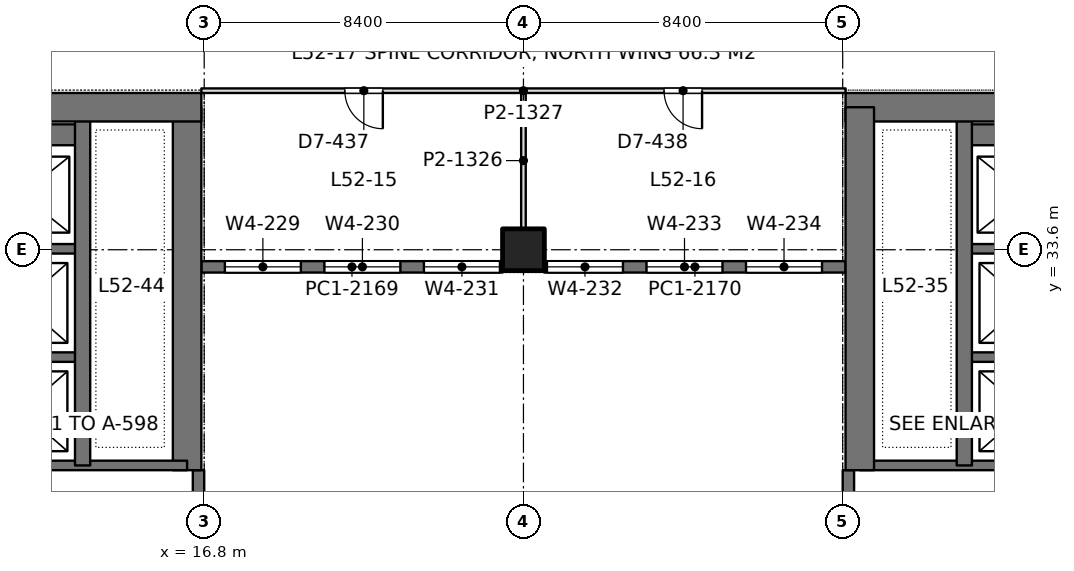
"""IFC4 building model, lengths in metres.
Left out: names, types, materials, properties, quantities, classifications, styles, units other than length and angle.
Written with IfcOpenShell. Run it as: python <this file> out.ifc"""

import sys

from ifc_helpers import new_model, si_unit, direction, frame, frame_2d, origin, origin_2d, place, context, subcontext, project, spatial, rectangle, extrude, element, fill, save


model = new_model("IFC4")
c1 = context("Model", 3, precision=1e-05, world=origin(), true_north=direction((0.0, 1.0)))
c2 = subcontext(c1, "Body", "Model", "MODEL_VIEW")
j1 = project(units=[si_unit("LENGTHUNIT", "METRE"), si_unit("PLANEANGLEUNIT", "RADIAN")], contexts=[c1])
p1 = place(None, origin())
s1 = spatial("IfcSite", under=j1, at=p1, CompositionType="ELEMENT")
p2 = place(p1, origin())
s2 = spatial("IfcBuilding", under=s1, at=p2, CompositionType="ELEMENT")
p3 = place(p2, frame((0.0, 0.0, 228.0)))
s3 = spatial("IfcBuildingStorey", under=s2, at=p3, CompositionType="ELEMENT", Elevation=228.0)
p4 = place(p3, frame((25.2, 33.6, 0.0), z_axis=(0.0, 0.0, 1.0), x_axis=(1.0, 0.0, 0.0)))
e1 = element("IfcColumn", 1, at=p4, inside=s3, PredefinedType="COLUMN", context=c2, shape_type="SweptSolid", body=[
    extrude(rectangle(XDim=1.1, YDim=1.1, at=origin_2d()), origin(), (0.0, 0.0, 1.0), 4.2),
])
p5 = place(p3, frame((-1.125, 37.35, 0.0), z_axis=(0.0, 0.0, 1.0), x_axis=(1.0, 0.0, 0.0)))
e2 = element("IfcWall", 2, at=p5, inside=s3, PredefinedType="SHEAR", context=c2, shape_type="SweptSolid", body=[
    extrude(rectangle(XDim=17.85, YDim=0.75, at=frame_2d((8.925, 0.0))), origin(), (0.0, 0.0, 1.0), 4.2),
])
p6 = place(p5, frame((8.875, 0.0, 0.0)))
e3 = element("IfcOpeningElement", 3, at=p6, cuts=e2, PredefinedType="OPENING", context=c2, shape_type="SweptSolid", body=[
    extrude(rectangle(XDim=1.8, YDim=2.4, at=frame_2d((0.9, 1.2))), frame((0.0, 0.385, 0.0), z_axis=(0.0, -1.0, 0.0), x_axis=(1.0, 0.0, 0.0)), (0.0, 0.0, 1.0), 0.77),
])
p7 = place(p3, frame((16.35, 27.8, 0.0), z_axis=(0.0, 0.0, 1.0), x_axis=(0.0, 1.0, 0.0)))
e4 = element("IfcWall", 4, at=p7, inside=s3, PredefinedType="SHEAR", context=c2, shape_type="SweptSolid", body=[
    extrude(rectangle(XDim=9.55, YDim=0.75, at=frame_2d((4.775, 0.0))), origin(), (0.0, 0.0, 1.0), 4.2),
])
p8 = place(p3, frame((13.6, 27.925, 0.0), z_axis=(0.0, 0.0, 1.0), x_axis=(0.0, 1.0, 0.0)))
e5 = element("IfcWall", 5, at=p8, inside=s3, PredefinedType="SHEAR", context=c2, shape_type="SweptSolid", body=[
    extrude(rectangle(XDim=9.425, YDim=0.4, at=frame_2d((4.712, 0.0))), origin(), (0.0, 0.0, 1.0), 4.2),
])
p9 = place(p3, frame((10.4, 27.925, 0.0), z_axis=(0.0, 0.0, 1.0), x_axis=(1.0, 0.0, 0.0)))
e6 = element("IfcWall", 6, at=p9, inside=s3, PredefinedType="SHEAR", context=c2, shape_type="SweptSolid", body=[
    extrude(rectangle(XDim=5.95, YDim=0.25, at=frame_2d((2.975, 0.0))), origin(), (0.0, 0.0, 1.0), 4.2),
])
for number, where, z_axis, x_axis in (
    (7, (10.4, 30.775, 0.0), (0.0, 0.0, 1.0), (1.0, 0.0, 0.0)),
    (8, (10.4, 33.625, 0.0), (0.0, 0.0, 1.0), (1.0, 0.0, 0.0)),
):
    element("IfcWall", number, at=place(p3, frame(where, z_axis=z_axis, x_axis=x_axis)), inside=s3, PredefinedType="SHEAR", context=c2, shape_type="SweptSolid", body=[
        extrude(rectangle(XDim=3.2, YDim=0.25, at=frame_2d((1.6, 0.0))), origin(), (0.0, 0.0, 1.0), 4.2),
    ])
p10 = place(p3, frame((10.4, 36.625, 0.0), z_axis=(0.0, 0.0, 1.0), x_axis=(1.0, 0.0, 0.0)))
e9 = element("IfcWall", 9, at=p10, inside=s3, PredefinedType="SHEAR", context=c2, shape_type="SweptSolid", body=[
    extrude(rectangle(XDim=3.2, YDim=0.55, at=frame_2d((1.6, 0.0))), origin(), (0.0, 0.0, 1.0), 4.2),
])
p11 = place(p3, frame((33.675, 37.35, 0.0), z_axis=(0.0, 0.0, 1.0), x_axis=(1.0, 0.0, 0.0)))
e10 = element("IfcWall", 10, at=p11, inside=s3, PredefinedType="SHEAR", context=c2, shape_type="SweptSolid", body=[
    extrude(rectangle(XDim=17.85, YDim=0.75, at=frame_2d((8.925, 0.0))), origin(), (0.0, 0.0, 1.0), 4.2),
])
p12 = place(p11, frame((7.175, 0.0, 0.0)))
e11 = element("IfcOpeningElement", 11, at=p12, cuts=e10, PredefinedType="OPENING", context=c2, shape_type="SweptSolid", body=[
    extrude(rectangle(XDim=1.8, YDim=2.4, at=frame_2d((0.9, 1.2))), frame((0.0, 0.385, 0.0), z_axis=(0.0, -1.0, 0.0), x_axis=(1.0, 0.0, 0.0)), (0.0, 0.0, 1.0), 0.77),
])
p13 = place(p3, frame((34.05, 27.8, 0.0), z_axis=(0.0, 0.0, 1.0), x_axis=(0.0, 1.0, 0.0)))
e12 = element("IfcWall", 12, at=p13, inside=s3, PredefinedType="SHEAR", context=c2, shape_type="SweptSolid", body=[
    extrude(rectangle(XDim=9.55, YDim=0.75, at=frame_2d((4.775, 0.0))), origin(), (0.0, 0.0, 1.0), 4.2),
])
p14 = place(p3, frame((36.8, 27.925, 0.0), z_axis=(0.0, 0.0, 1.0), x_axis=(0.0, 1.0, 0.0)))
e13 = element("IfcWall", 13, at=p14, inside=s3, PredefinedType="SHEAR", context=c2, shape_type="SweptSolid", body=[
    extrude(rectangle(XDim=9.425, YDim=0.4, at=frame_2d((4.712, 0.0))), origin(), (0.0, 0.0, 1.0), 4.2),
])
p15 = place(p3, frame((40.0, 27.925, 0.0), z_axis=(0.0, 0.0, 1.0), x_axis=(-1.0, 0.0, 0.0)))
e14 = element("IfcWall", 14, at=p15, inside=s3, PredefinedType="SHEAR", context=c2, shape_type="SweptSolid", body=[
    extrude(rectangle(XDim=5.95, YDim=0.25, at=frame_2d((2.975, 0.0))), origin(), (0.0, 0.0, 1.0), 4.2),
])
for number, where, z_axis, x_axis in (
    (15, (40.0, 30.775, 0.0), (0.0, 0.0, 1.0), (-1.0, 0.0, 0.0)),
    (16, (40.0, 33.625, 0.0), (0.0, 0.0, 1.0), (-1.0, 0.0, 0.0)),
):
    element("IfcWall", number, at=place(p3, frame(where, z_axis=z_axis, x_axis=x_axis)), inside=s3, PredefinedType="SHEAR", context=c2, shape_type="SweptSolid", body=[
        extrude(rectangle(XDim=3.2, YDim=0.25, at=frame_2d((1.6, 0.0))), origin(), (0.0, 0.0, 1.0), 4.2),
    ])
p16 = place(p3, frame((40.0, 36.625, 0.0), z_axis=(0.0, 0.0, 1.0), x_axis=(-1.0, 0.0, 0.0)))
e17 = element("IfcWall", 17, at=p16, inside=s3, PredefinedType="SHEAR", context=c2, shape_type="SweptSolid", body=[
    extrude(rectangle(XDim=3.2, YDim=0.55, at=frame_2d((1.6, 0.0))), origin(), (0.0, 0.0, 1.0), 4.2),
])
p17 = place(p3, frame((16.65, 17.1, 0.0), z_axis=(0.0, 0.0, 1.0), x_axis=(0.0, 1.0, 0.0)))
e18 = element("IfcWall", 18, at=p17, inside=s3, PredefinedType="SOLIDWALL", context=c2, shape_type="SweptSolid", body=[
    extrude(rectangle(XDim=10.7, YDim=0.3, at=frame_2d((5.35, 0.0))), origin(), (0.0, 0.0, 1.0), 4.05),
])
p18 = place(p17, frame((0.55, 0.0, 0.9)))
e19 = element("IfcOpeningElement", 19, at=p18, cuts=e18, PredefinedType="OPENING", context=c2, shape_type="SweptSolid", body=[
    extrude(rectangle(XDim=2.0, YDim=1.9, at=frame_2d((1.0, 0.95))), frame((0.0, 0.16, 0.0), z_axis=(0.0, -1.0, 0.0), x_axis=(1.0, 0.0, 0.0)), (0.0, 0.0, 1.0), 0.32),
])
p19 = place(p17, frame((2.9, 0.0, 0.9)))
e20 = element("IfcOpeningElement", 20, at=p19, cuts=e18, PredefinedType="OPENING", context=c2, shape_type="SweptSolid", body=[
    extrude(rectangle(XDim=2.0, YDim=1.9, at=frame_2d((1.0, 0.95))), frame((0.0, 0.16, 0.0), z_axis=(0.0, -1.0, 0.0), x_axis=(1.0, 0.0, 0.0)), (0.0, 0.0, 1.0), 0.32),
])
p20 = place(p17, frame((7.675, 0.0, 0.9)))
e21 = element("IfcOpeningElement", 21, at=p20, cuts=e18, PredefinedType="OPENING", context=c2, shape_type="SweptSolid", body=[
    extrude(rectangle(XDim=2.0, YDim=1.9, at=frame_2d((1.0, 0.95))), frame((0.0, 0.16, 0.0), z_axis=(0.0, -1.0, 0.0), x_axis=(1.0, 0.0, 0.0)), (0.0, 0.0, 1.0), 0.32),
])
p21 = place(p3, frame((33.75, 17.1, 0.0), z_axis=(0.0, 0.0, 1.0), x_axis=(0.0, 1.0, 0.0)))
e22 = element("IfcWall", 22, at=p21, inside=s3, PredefinedType="SOLIDWALL", context=c2, shape_type="SweptSolid", body=[
    extrude(rectangle(XDim=10.7, YDim=0.3, at=frame_2d((5.35, 0.0))), origin(), (0.0, 0.0, 1.0), 4.05),
])
p22 = place(p21, frame((0.55, 0.0, 0.9)))
e23 = element("IfcOpeningElement", 23, at=p22, cuts=e22, PredefinedType="OPENING", context=c2, shape_type="SweptSolid", body=[
    extrude(rectangle(XDim=2.0, YDim=1.9, at=frame_2d((1.0, 0.95))), frame((0.0, 0.16, 0.0), z_axis=(0.0, -1.0, 0.0), x_axis=(1.0, 0.0, 0.0)), (0.0, 0.0, 1.0), 0.32),
])
p23 = place(p21, frame((2.9, 0.0, 0.9)))
e24 = element("IfcOpeningElement", 24, at=p23, cuts=e22, PredefinedType="OPENING", context=c2, shape_type="SweptSolid", body=[
    extrude(rectangle(XDim=2.0, YDim=1.9, at=frame_2d((1.0, 0.95))), frame((0.0, 0.16, 0.0), z_axis=(0.0, -1.0, 0.0), x_axis=(1.0, 0.0, 0.0)), (0.0, 0.0, 1.0), 0.32),
])
p24 = place(p21, frame((7.675, 0.0, 0.9)))
e25 = element("IfcOpeningElement", 25, at=p24, cuts=e22, PredefinedType="OPENING", context=c2, shape_type="SweptSolid", body=[
    extrude(rectangle(XDim=2.0, YDim=1.9, at=frame_2d((1.0, 0.95))), frame((0.0, 0.16, 0.0), z_axis=(0.0, -1.0, 0.0), x_axis=(1.0, 0.0, 0.0)), (0.0, 0.0, 1.0), 0.32),
])
p25 = place(p3, frame((16.725, 33.15, 0.0), z_axis=(0.0, 0.0, 1.0), x_axis=(1.0, 0.0, 0.0)))
e26 = element("IfcWall", 26, at=p25, inside=s3, PredefinedType="SOLIDWALL", context=c2, shape_type="SweptSolid", body=[
    extrude(rectangle(XDim=7.925, YDim=0.3, at=frame_2d((3.962, 0.0))), origin(), (0.0, 0.0, 1.0), 4.05),
])
p26 = place(p25, frame((0.619, 0.0, 0.9)))
e27 = element("IfcOpeningElement", 27, at=p26, cuts=e26, PredefinedType="OPENING", context=c2, shape_type="SweptSolid", body=[
    extrude(rectangle(XDim=2.0, YDim=1.9, at=frame_2d((1.0, 0.95))), frame((0.0, 0.16, 0.0), z_axis=(0.0, -1.0, 0.0), x_axis=(1.0, 0.0, 0.0)), (0.0, 0.0, 1.0), 0.32),
])
p27 = place(p25, frame((3.238, 0.0, 0.9)))
e28 = element("IfcOpeningElement", 28, at=p27, cuts=e26, PredefinedType="OPENING", context=c2, shape_type="SweptSolid", body=[
    extrude(rectangle(XDim=2.0, YDim=1.9, at=frame_2d((1.0, 0.95))), frame((0.0, 0.16, 0.0), z_axis=(0.0, -1.0, 0.0), x_axis=(1.0, 0.0, 0.0)), (0.0, 0.0, 1.0), 0.32),
])
p28 = place(p25, frame((5.856, 0.0, 0.9)))
e29 = element("IfcOpeningElement", 29, at=p28, cuts=e26, PredefinedType="OPENING", context=c2, shape_type="SweptSolid", body=[
    extrude(rectangle(XDim=2.0, YDim=1.9, at=frame_2d((1.0, 0.95))), frame((0.0, 0.16, 0.0), z_axis=(0.0, -1.0, 0.0), x_axis=(1.0, 0.0, 0.0)), (0.0, 0.0, 1.0), 0.32),
])
p29 = place(p3, frame((25.75, 33.15, 0.0), z_axis=(0.0, 0.0, 1.0), x_axis=(1.0, 0.0, 0.0)))
e30 = element("IfcWall", 30, at=p29, inside=s3, PredefinedType="SOLIDWALL", context=c2, shape_type="SweptSolid", body=[
    extrude(rectangle(XDim=7.925, YDim=0.3, at=frame_2d((3.962, 0.0))), origin(), (0.0, 0.0, 1.0), 4.05),
])
p30 = place(p29, frame((0.069, 0.0, 0.9)))
e31 = element("IfcOpeningElement", 31, at=p30, cuts=e30, PredefinedType="OPENING", context=c2, shape_type="SweptSolid", body=[
    extrude(rectangle(XDim=2.0, YDim=1.9, at=frame_2d((1.0, 0.95))), frame((0.0, 0.16, 0.0), z_axis=(0.0, -1.0, 0.0), x_axis=(1.0, 0.0, 0.0)), (0.0, 0.0, 1.0), 0.32),
])
p31 = place(p29, frame((2.688, 0.0, 0.9)))
e32 = element("IfcOpeningElement", 32, at=p31, cuts=e30, PredefinedType="OPENING", context=c2, shape_type="SweptSolid", body=[
    extrude(rectangle(XDim=2.0, YDim=1.9, at=frame_2d((1.0, 0.95))), frame((0.0, 0.16, 0.0), z_axis=(0.0, -1.0, 0.0), x_axis=(1.0, 0.0, 0.0)), (0.0, 0.0, 1.0), 0.32),
])
p32 = place(p29, frame((5.306, 0.0, 0.9)))
e33 = element("IfcOpeningElement", 33, at=p32, cuts=e30, PredefinedType="OPENING", context=c2, shape_type="SweptSolid", body=[
    extrude(rectangle(XDim=2.0, YDim=1.9, at=frame_2d((1.0, 0.95))), frame((0.0, 0.16, 0.0), z_axis=(0.0, -1.0, 0.0), x_axis=(1.0, 0.0, 0.0)), (0.0, 0.0, 1.0), 0.32),
])
p33 = place(p3, frame((25.2, 34.149, 0.0), z_axis=(0.0, 0.0, 1.0), x_axis=(0.0, 1.0, 0.0)))
e34 = element("IfcWall", 34, at=p33, inside=s3, PredefinedType="PARTITIONING", context=c2, shape_type="SweptSolid", body=[
    extrude(rectangle(XDim=3.593, YDim=0.12, at=frame_2d((1.796, 0.0))), origin(), (0.0, 0.0, 1.0), 3.55),
])
p34 = place(p3, frame((16.725, 37.785, 0.0), z_axis=(0.0, 0.0, 1.0), x_axis=(1.0, 0.0, 0.0)))
e35 = element("IfcWall", 35, at=p34, inside=s3, PredefinedType="PARTITIONING", context=c2, shape_type="SweptSolid", body=[
    extrude(rectangle(XDim=16.95, YDim=0.12, at=frame_2d((8.475, 0.0))), origin(), (0.0, 0.0, 1.0), 3.55),
])
p35 = place(p34, frame((3.775, 0.0, 0.0)))
e36 = element("IfcOpeningElement", 36, at=p35, cuts=e35, PredefinedType="OPENING", context=c2, shape_type="SweptSolid", body=[
    extrude(rectangle(XDim=1.0, YDim=2.4, at=frame_2d((0.5, 1.2))), frame((0.0, 0.07, 0.0), z_axis=(0.0, -1.0, 0.0), x_axis=(1.0, 0.0, 0.0)), (0.0, 0.0, 1.0), 0.14),
])
p36 = place(p34, frame((12.175, 0.0, 0.0)))
e37 = element("IfcOpeningElement", 37, at=p36, cuts=e35, PredefinedType="OPENING", context=c2, shape_type="SweptSolid", body=[
    extrude(rectangle(XDim=1.0, YDim=2.4, at=frame_2d((0.5, 1.2))), frame((0.0, 0.07, 0.0), z_axis=(0.0, -1.0, 0.0), x_axis=(1.0, 0.0, 0.0)), (0.0, 0.0, 1.0), 0.14),
])
p37 = place(p26, origin())
e38 = element("IfcWindow", 38, at=p37, inside=s3, PartitioningType="SINGLE_PANEL", PredefinedType="WINDOW", context=c2, shape_type="SweptSolid", body=[
    extrude(rectangle(XDim=2.0, YDim=1.9, at=frame_2d((1.0, 0.95))), frame((0.0, 0.03, 0.0), z_axis=(0.0, -1.0, 0.0), x_axis=(1.0, 0.0, 0.0)), (0.0, 0.0, 1.0), 0.06),
])
fill(e27, e38)
p38 = place(p27, origin())
e39 = element("IfcWindow", 39, at=p38, inside=s3, PartitioningType="SINGLE_PANEL", PredefinedType="WINDOW", context=c2, shape_type="SweptSolid", body=[
    extrude(rectangle(XDim=2.0, YDim=1.9, at=frame_2d((1.0, 0.95))), frame((0.0, 0.03, 0.0), z_axis=(0.0, -1.0, 0.0), x_axis=(1.0, 0.0, 0.0)), (0.0, 0.0, 1.0), 0.06),
])
fill(e28, e39)
p39 = place(p28, origin())
e40 = element("IfcWindow", 40, at=p39, inside=s3, PartitioningType="SINGLE_PANEL", PredefinedType="WINDOW", context=c2, shape_type="SweptSolid", body=[
    extrude(rectangle(XDim=2.0, YDim=1.9, at=frame_2d((1.0, 0.95))), frame((0.0, 0.03, 0.0), z_axis=(0.0, -1.0, 0.0), x_axis=(1.0, 0.0, 0.0)), (0.0, 0.0, 1.0), 0.06),
])
fill(e29, e40)
p40 = place(p30, origin())
e41 = element("IfcWindow", 41, at=p40, inside=s3, PartitioningType="SINGLE_PANEL", PredefinedType="WINDOW", context=c2, shape_type="SweptSolid", body=[
    extrude(rectangle(XDim=2.0, YDim=1.9, at=frame_2d((1.0, 0.95))), frame((0.0, 0.03, 0.0), z_axis=(0.0, -1.0, 0.0), x_axis=(1.0, 0.0, 0.0)), (0.0, 0.0, 1.0), 0.06),
])
fill(e31, e41)
p41 = place(p31, origin())
e42 = element("IfcWindow", 42, at=p41, inside=s3, PartitioningType="SINGLE_PANEL", PredefinedType="WINDOW", context=c2, shape_type="SweptSolid", body=[
    extrude(rectangle(XDim=2.0, YDim=1.9, at=frame_2d((1.0, 0.95))), frame((0.0, 0.03, 0.0), z_axis=(0.0, -1.0, 0.0), x_axis=(1.0, 0.0, 0.0)), (0.0, 0.0, 1.0), 0.06),
])
fill(e32, e42)
p42 = place(p32, origin())
e43 = element("IfcWindow", 43, at=p42, inside=s3, PartitioningType="SINGLE_PANEL", PredefinedType="WINDOW", context=c2, shape_type="SweptSolid", body=[
    extrude(rectangle(XDim=2.0, YDim=1.9, at=frame_2d((1.0, 0.95))), frame((0.0, 0.03, 0.0), z_axis=(0.0, -1.0, 0.0), x_axis=(1.0, 0.0, 0.0)), (0.0, 0.0, 1.0), 0.06),
])
fill(e33, e43)
p43 = place(p35, frame((1.0, 0.0, 0.0), z_axis=(0.0, 0.0, 1.0), x_axis=(-1.0, 0.0, 0.0)))
e44 = element("IfcDoor", 44, at=p43, inside=s3, OperationType="SINGLE_SWING_LEFT", PredefinedType="DOOR", context=c2, shape_type="SweptSolid", body=[
    extrude(rectangle(XDim=1.0, YDim=2.4, at=frame_2d((0.5, 1.2))), frame((0.0, 0.025, 0.0), z_axis=(0.0, -1.0, 0.0), x_axis=(1.0, 0.0, 0.0)), (0.0, 0.0, 1.0), 0.05),
])
fill(e36, e44)
p44 = place(p36, frame((1.0, 0.0, 0.0), z_axis=(0.0, 0.0, 1.0), x_axis=(-1.0, 0.0, 0.0)))
e45 = element("IfcDoor", 45, at=p44, inside=s3, OperationType="SINGLE_SWING_LEFT", PredefinedType="DOOR", context=c2, shape_type="SweptSolid", body=[
    extrude(rectangle(XDim=1.0, YDim=2.4, at=frame_2d((0.5, 1.2))), frame((0.0, 0.025, 0.0), z_axis=(0.0, -1.0, 0.0), x_axis=(1.0, 0.0, 0.0)), (0.0, 0.0, 1.0), 0.05),
])
fill(e37, e45)
save(model, sys.argv[1])
